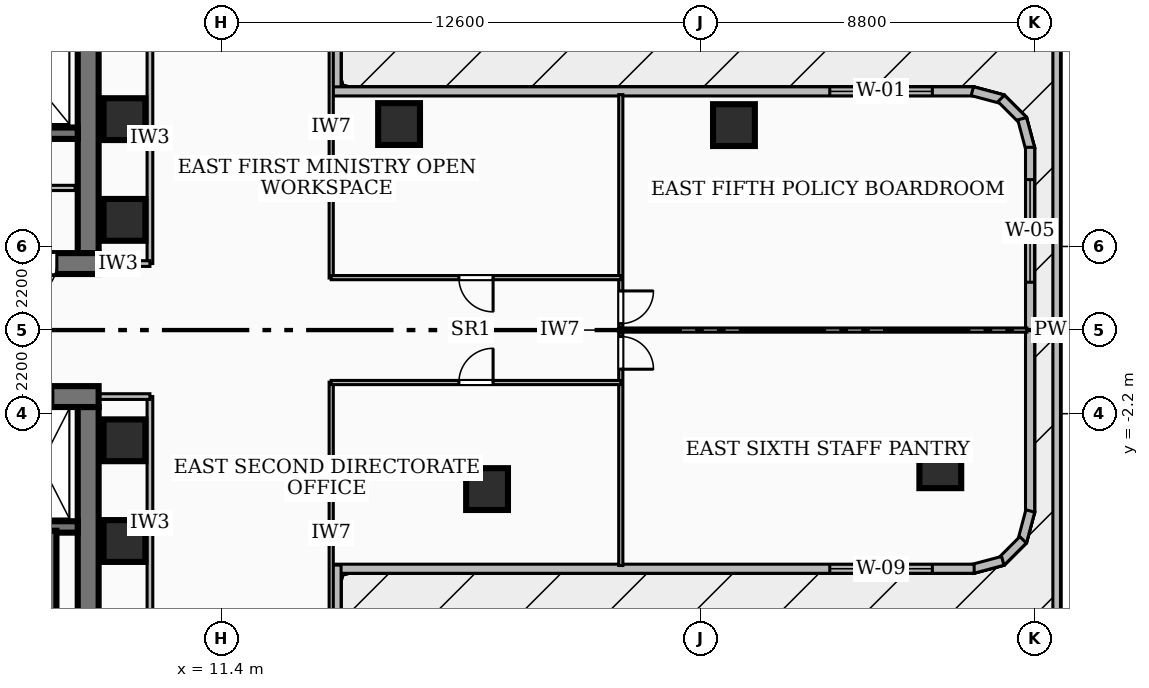
"""IFC4 building model, lengths in metres.
Left out: names, types, materials, properties, quantities, classifications, styles, units other than length and angle.
Written with IfcOpenShell. Run it as: python <this file> out.ifc"""

import sys

from ifc_helpers import new_model, si_unit, direction, frame, frame_2d, origin, origin_2d, place, context, subcontext, project, spatial, rectangle, extrude, element, fill, save


model = new_model("IFC4")
c1 = context("Model", 3, precision=1e-05, world=origin(), true_north=direction((0.0, 1.0)))
c2 = subcontext(c1, "Body", "Model", "MODEL_VIEW")
j1 = project(units=[si_unit("LENGTHUNIT", "METRE"), si_unit("PLANEANGLEUNIT", "RADIAN")], contexts=[c1])
p1 = place(None, origin())
s1 = spatial("IfcSite", under=j1, at=p1, CompositionType="ELEMENT")
p2 = place(p1, origin())
s2 = spatial("IfcBuilding", under=s1, at=p2, CompositionType="ELEMENT")
p3 = place(p2, frame((0.0, 0.0, 24.48)))
s3 = spatial("IfcBuildingStorey", under=s2, at=p3, CompositionType="ELEMENT", Elevation=24.48)
p4 = place(p3, frame((8.17, 1.75, 0.0), z_axis=(0.0, 0.0, 1.0), x_axis=(-1.0, 0.0, 0.0)))
e1 = element("IfcWall", 1, at=p4, inside=s3, PredefinedType="SHEAR", context=c2, shape_type="SweptSolid", body=[
    extrude(rectangle(XDim=16.34, YDim=0.55, at=frame_2d((8.17, 0.0))), origin(), (0.0, 0.0, 1.0), 3.34),
])
p5 = place(p4, frame((7.45, 0.0, 0.0)))
e2 = element("IfcOpeningElement", 2, at=p5, cuts=e1, PredefinedType="OPENING", context=c2, shape_type="SweptSolid", body=[
    extrude(rectangle(XDim=1.0, YDim=2.1, at=frame_2d((0.5, 1.05))), frame((0.0, 0.285, 0.0), z_axis=(0.0, -1.0, 0.0), x_axis=(1.0, 0.0, 0.0)), (0.0, 0.0, 1.0), 0.57),
])
p6 = place(p4, frame((3.4, 0.0, 0.0)))
e3 = element("IfcOpeningElement", 3, at=p6, cuts=e1, PredefinedType="OPENING", context=c2, shape_type="SweptSolid", body=[
    extrude(rectangle(XDim=0.9, YDim=2.06, at=frame_2d((0.45, 1.03))), frame((0.0, 0.285, 0.0), z_axis=(0.0, -1.0, 0.0), x_axis=(1.0, 0.0, 0.0)), (0.0, 0.0, 1.0), 0.57),
])
p7 = place(p4, frame((1.1, 0.0, 0.0)))
e4 = element("IfcOpeningElement", 4, at=p7, cuts=e1, PredefinedType="OPENING", context=c2, shape_type="SweptSolid", body=[
    extrude(rectangle(XDim=0.9, YDim=2.06, at=frame_2d((0.45, 1.03))), frame((0.0, 0.285, 0.0), z_axis=(0.0, -1.0, 0.0), x_axis=(1.0, 0.0, 0.0)), (0.0, 0.0, 1.0), 0.57),
])
p8 = place(p3, frame((7.895, 8.31, 0.0), z_axis=(0.0, 0.0, 1.0), x_axis=(0.0, -1.0, 0.0)))
e5 = element("IfcWall", 5, at=p8, inside=s3, PredefinedType="SHEAR", context=c2, shape_type="SweptSolid", body=[
    extrude(rectangle(XDim=6.285, YDim=0.55, at=frame_2d((3.143, 0.0))), origin(), (0.0, 0.0, 1.0), 3.34),
])
p9 = place(p3, frame((7.62, 5.18, 0.0), z_axis=(0.0, 0.0, 1.0), x_axis=(-1.0, 0.0, 0.0)))
e6 = element("IfcWall", 6, at=p9, inside=s3, PredefinedType="SOLIDWALL", context=c2, shape_type="SweptSolid", body=[
    extrude(rectangle(XDim=15.24, YDim=0.3, at=frame_2d((7.62, 0.0))), origin(), (0.0, 0.0, 1.0), 3.34),
])
p10 = place(p9, frame((5.77, 0.0, 0.0)))
e7 = element("IfcOpeningElement", 7, at=p10, cuts=e6, PredefinedType="OPENING", context=c2, shape_type="SweptSolid", body=[
    extrude(rectangle(XDim=1.1, YDim=2.15, at=frame_2d((0.55, 1.075))), frame((0.0, 0.16, 0.0), z_axis=(0.0, -1.0, 0.0), x_axis=(1.0, 0.0, 0.0)), (0.0, 0.0, 1.0), 0.32),
])
p11 = place(p9, frame((2.97, 0.0, 0.0)))
e8 = element("IfcOpeningElement", 8, at=p11, cuts=e6, PredefinedType="OPENING", context=c2, shape_type="SweptSolid", body=[
    extrude(rectangle(XDim=1.1, YDim=2.15, at=frame_2d((0.55, 1.075))), frame((0.0, 0.16, 0.0), z_axis=(0.0, -1.0, 0.0), x_axis=(1.0, 0.0, 0.0)), (0.0, 0.0, 1.0), 0.32),
])
p12 = place(p9, frame((7.97, 0.0, 0.0)))
e9 = element("IfcOpeningElement", 9, at=p12, cuts=e6, PredefinedType="OPENING", context=c2, shape_type="SweptSolid", body=[
    extrude(rectangle(XDim=1.0, YDim=2.1, at=frame_2d((0.5, 1.05))), frame((0.0, 0.16, 0.0), z_axis=(0.0, -1.0, 0.0), x_axis=(1.0, 0.0, 0.0)), (0.0, 0.0, 1.0), 0.32),
])
p13 = place(p3, frame((-8.17, -1.75, 0.0), z_axis=(0.0, 0.0, 1.0), x_axis=(1.0, 0.0, 0.0)))
e10 = element("IfcWall", 10, at=p13, inside=s3, PredefinedType="SHEAR", context=c2, shape_type="SweptSolid", body=[
    extrude(rectangle(XDim=16.34, YDim=0.55, at=frame_2d((8.17, 0.0))), origin(), (0.0, 0.0, 1.0), 3.34),
])
p14 = place(p13, frame((7.45, 0.0, 0.0)))
e11 = element("IfcOpeningElement", 11, at=p14, cuts=e10, PredefinedType="OPENING", context=c2, shape_type="SweptSolid", body=[
    extrude(rectangle(XDim=1.0, YDim=2.1, at=frame_2d((0.5, 1.05))), frame((0.0, 0.285, 0.0), z_axis=(0.0, -1.0, 0.0), x_axis=(1.0, 0.0, 0.0)), (0.0, 0.0, 1.0), 0.57),
])
p15 = place(p13, frame((10.965, 0.0, 0.0)))
e12 = element("IfcOpeningElement", 12, at=p15, cuts=e10, PredefinedType="OPENING", context=c2, shape_type="SweptSolid", body=[
    extrude(rectangle(XDim=1.05, YDim=2.15, at=frame_2d((0.525, 1.075))), frame((0.0, 0.285, 0.0), z_axis=(0.0, -1.0, 0.0), x_axis=(1.0, 0.0, 0.0)), (0.0, 0.0, 1.0), 0.57),
])
p16 = place(p13, frame((12.525, 0.0, 0.0)))
e13 = element("IfcOpeningElement", 13, at=p16, cuts=e10, PredefinedType="OPENING", context=c2, shape_type="SweptSolid", body=[
    extrude(rectangle(XDim=1.05, YDim=2.15, at=frame_2d((0.525, 1.075))), frame((0.0, 0.285, 0.0), z_axis=(0.0, -1.0, 0.0), x_axis=(1.0, 0.0, 0.0)), (0.0, 0.0, 1.0), 0.57),
])
p17 = place(p13, frame((14.085, 0.0, 0.0)))
e14 = element("IfcOpeningElement", 14, at=p17, cuts=e10, PredefinedType="OPENING", context=c2, shape_type="SweptSolid", body=[
    extrude(rectangle(XDim=1.05, YDim=2.15, at=frame_2d((0.525, 1.075))), frame((0.0, 0.285, 0.0), z_axis=(0.0, -1.0, 0.0), x_axis=(1.0, 0.0, 0.0)), (0.0, 0.0, 1.0), 0.57),
])
p18 = place(p3, frame((7.895, -2.025, 0.0), z_axis=(0.0, 0.0, 1.0), x_axis=(0.0, -1.0, 0.0)))
e15 = element("IfcWall", 15, at=p18, inside=s3, PredefinedType="SHEAR", context=c2, shape_type="SweptSolid", body=[
    extrude(rectangle(XDim=6.285, YDim=0.55, at=frame_2d((3.143, 0.0))), origin(), (0.0, 0.0, 1.0), 3.34),
])
p19 = place(p3, frame((-7.62, -5.18, 0.0), z_axis=(0.0, 0.0, 1.0), x_axis=(1.0, 0.0, 0.0)))
e16 = element("IfcWall", 16, at=p19, inside=s3, PredefinedType="SOLIDWALL", context=c2, shape_type="SweptSolid", body=[
    extrude(rectangle(XDim=15.24, YDim=0.3, at=frame_2d((7.62, 0.0))), origin(), (0.0, 0.0, 1.0), 3.34),
])
p20 = place(p19, frame((5.77, 0.0, 0.0)))
e17 = element("IfcOpeningElement", 17, at=p20, cuts=e16, PredefinedType="OPENING", context=c2, shape_type="SweptSolid", body=[
    extrude(rectangle(XDim=1.1, YDim=2.15, at=frame_2d((0.55, 1.075))), frame((0.0, 0.16, 0.0), z_axis=(0.0, -1.0, 0.0), x_axis=(1.0, 0.0, 0.0)), (0.0, 0.0, 1.0), 0.32),
])
p21 = place(p19, frame((7.97, 0.0, 0.0)))
e18 = element("IfcOpeningElement", 18, at=p21, cuts=e16, PredefinedType="OPENING", context=c2, shape_type="SweptSolid", body=[
    extrude(rectangle(XDim=1.0, YDim=2.1, at=frame_2d((0.5, 1.05))), frame((0.0, 0.16, 0.0), z_axis=(0.0, -1.0, 0.0), x_axis=(1.0, 0.0, 0.0)), (0.0, 0.0, 1.0), 0.32),
])
p22 = place(p3, frame((6.95, -8.34, 0.0), z_axis=(0.0, 0.0, 1.0), x_axis=(0.0, 1.0, 0.0)))
e19 = element("IfcWall", 19, at=p22, inside=s3, PredefinedType="SOLIDWALL", context=c2, shape_type="SweptSolid", body=[
    extrude(rectangle(XDim=3.06, YDim=0.22, at=frame_2d((1.53, 0.0))), origin(), (0.0, 0.0, 1.0), 3.34),
])
for number, where, z_axis, x_axis in (
    (20, (8.85, -5.55, 0.0), (0.0, 0.0, 1.0), (1.0, 0.0, 0.0)),
    (21, (8.85, -2.9, 0.0), (0.0, 0.0, 1.0), (1.0, 0.0, 0.0)),
    (22, (8.85, 2.9, 0.0), (0.0, 0.0, 1.0), (1.0, 0.0, 0.0)),
    (23, (8.85, 5.55, 0.0), (0.0, 0.0, 1.0), (1.0, 0.0, 0.0)),
    (24, (18.391, -4.184, 0.0), (0.0, 0.0, 1.0), (1.0, 0.0, 0.0)),
    (25, (16.076, 5.421, 0.0), (0.0, 0.0, 1.0), (1.0, 0.0, 0.0)),
    (26, (30.318, -3.609, 0.0), (0.0, 0.0, 1.0), (1.0, 0.0, 0.0)),
    (27, (24.888, 5.393, 0.0), (0.0, 0.0, 1.0), (1.0, 0.0, 0.0)),
):
    element("IfcColumn", number, at=place(p3, frame(where, z_axis=z_axis, x_axis=x_axis)), inside=s3, PredefinedType="COLUMN", context=c2, shape_type="SweptSolid", body=[
        extrude(rectangle(XDim=1.1, YDim=1.1, at=origin_2d()), origin(), (0.0, 0.0, 1.0), 3.6),
    ])
p23 = place(p3, frame((14.43, 12.959, 0.0), z_axis=(0.0, 0.0, 1.0), x_axis=(0.0, -1.0, 0.0)))
e28 = element("IfcWall", 28, at=p23, inside=s3, PredefinedType="SOLIDWALL", context=c2, shape_type="SweptSolid", body=[
    extrude(rectangle(XDim=6.775, YDim=0.24, at=frame_2d((3.387, 0.0))), origin(), (0.0, 0.0, 1.0), 3.34),
])
p24 = place(p3, frame((14.334, 6.28, 0.0), z_axis=(0.0, 0.0, 1.0), x_axis=(1.0, 0.0, 0.0)))
e29 = element("IfcWall", 29, at=p24, inside=s3, PredefinedType="SOLIDWALL", context=c2, shape_type="SweptSolid", body=[
    extrude(rectangle(XDim=16.875, YDim=0.24, at=frame_2d((8.438, 0.0))), origin(), (0.0, 0.0, 1.0), 3.34),
])
p25 = place(p24, frame((13.075, 0.0, 0.85)))
e30 = element("IfcOpeningElement", 30, at=p25, cuts=e29, PredefinedType="OPENING", context=c2, shape_type="SweptSolid", body=[
    extrude(rectangle(XDim=2.7, YDim=2.1, at=frame_2d((1.35, 1.05))), frame((0.0, 0.13, 0.0), z_axis=(0.0, -1.0, 0.0), x_axis=(1.0, 0.0, 0.0)), (0.0, 0.0, 1.0), 0.26),
])
p26 = place(p3, frame((31.16, 6.286, 0.0), z_axis=(0.0, 0.0, 1.0), x_axis=(0.966234939601, -0.25766265056, 0.0)))
e31 = element("IfcWall", 31, at=p26, inside=s3, PredefinedType="SOLIDWALL", context=c2, shape_type="SweptSolid", body=[
    extrude(rectangle(XDim=0.83, YDim=0.24, at=frame_2d((0.415, 0.0))), origin(), (0.0, 0.0, 1.0), 3.34),
])
p27 = place(p3, frame((31.92, 6.096, 0.0), z_axis=(0.0, 0.0, 1.0), x_axis=(0.707256607812, -0.706956922808, 0.0)))
e32 = element("IfcWall", 32, at=p27, inside=s3, PredefinedType="SOLIDWALL", context=c2, shape_type="SweptSolid", body=[
    extrude(rectangle(XDim=0.815, YDim=0.24, at=frame_2d((0.407, 0.0))), origin(), (0.0, 0.0, 1.0), 3.34),
])
p28 = place(p3, frame((32.472, 5.562, 0.0), z_axis=(0.0, 0.0, 1.0), x_axis=(0.257937227116, -0.966161677396, 0.0)))
e33 = element("IfcWall", 33, at=p28, inside=s3, PredefinedType="SOLIDWALL", context=c2, shape_type="SweptSolid", body=[
    extrude(rectangle(XDim=0.83, YDim=0.24, at=frame_2d((0.415, 0.0))), origin(), (0.0, 0.0, 1.0), 3.34),
])
p29 = place(p3, frame((32.68, 4.809, 0.0), z_axis=(0.0, 0.0, 1.0), x_axis=(0.0, -1.0, 0.0)))
e34 = element("IfcWall", 34, at=p29, inside=s3, PredefinedType="SOLIDWALL", context=c2, shape_type="SweptSolid", body=[
    extrude(rectangle(XDim=9.618, YDim=0.24, at=frame_2d((4.809, 0.0))), origin(), (0.0, 0.0, 1.0), 3.34),
])
p30 = place(p29, frame((0.85, 0.0, 0.85)))
e35 = element("IfcOpeningElement", 35, at=p30, cuts=e34, PredefinedType="OPENING", context=c2, shape_type="SweptSolid", body=[
    extrude(rectangle(XDim=2.7, YDim=1.85, at=frame_2d((1.35, 0.925))), frame((0.0, 0.13, 0.0), z_axis=(0.0, -1.0, 0.0), x_axis=(1.0, 0.0, 0.0)), (0.0, 0.0, 1.0), 0.26),
])
p31 = place(p3, frame((32.686, -4.76, 0.0), z_axis=(0.0, 0.0, 1.0), x_axis=(-0.257937227116, -0.966161677396, 0.0)))
e36 = element("IfcWall", 36, at=p31, inside=s3, PredefinedType="SOLIDWALL", context=c2, shape_type="SweptSolid", body=[
    extrude(rectangle(XDim=0.83, YDim=0.24, at=frame_2d((0.415, 0.0))), origin(), (0.0, 0.0, 1.0), 3.34),
])
p32 = place(p3, frame((32.496, -5.52, 0.0), z_axis=(0.0, 0.0, 1.0), x_axis=(-0.707256607812, -0.706956922808, 0.0)))
e37 = element("IfcWall", 37, at=p32, inside=s3, PredefinedType="SOLIDWALL", context=c2, shape_type="SweptSolid", body=[
    extrude(rectangle(XDim=0.815, YDim=0.24, at=frame_2d((0.407, 0.0))), origin(), (0.0, 0.0, 1.0), 3.34),
])
p33 = place(p3, frame((31.962, -6.072, 0.0), z_axis=(0.0, 0.0, 1.0), x_axis=(-0.966234939601, -0.25766265056, 0.0)))
e38 = element("IfcWall", 38, at=p33, inside=s3, PredefinedType="SOLIDWALL", context=c2, shape_type="SweptSolid", body=[
    extrude(rectangle(XDim=0.83, YDim=0.24, at=frame_2d((0.415, 0.0))), origin(), (0.0, 0.0, 1.0), 3.34),
])
p34 = place(p3, frame((31.209, -6.28, 0.0), z_axis=(0.0, 0.0, 1.0), x_axis=(-1.0, 0.0, 0.0)))
e39 = element("IfcWall", 39, at=p34, inside=s3, PredefinedType="SOLIDWALL", context=c2, shape_type="SweptSolid", body=[
    extrude(rectangle(XDim=16.875, YDim=0.24, at=frame_2d((8.438, 0.0))), origin(), (0.0, 0.0, 1.0), 3.34),
])
p35 = place(p34, frame((1.1, 0.0, 0.85)))
e40 = element("IfcOpeningElement", 40, at=p35, cuts=e39, PredefinedType="OPENING", context=c2, shape_type="SweptSolid", body=[
    extrude(rectangle(XDim=2.7, YDim=1.65, at=frame_2d((1.35, 0.825))), frame((0.0, 0.13, 0.0), z_axis=(0.0, -1.0, 0.0), x_axis=(1.0, 0.0, 0.0)), (0.0, 0.0, 1.0), 0.26),
])
p36 = place(p3, frame((14.43, -6.184, 0.0), z_axis=(0.0, 0.0, 1.0), x_axis=(0.0, -1.0, 0.0)))
e41 = element("IfcWall", 41, at=p36, inside=s3, PredefinedType="SOLIDWALL", context=c2, shape_type="SweptSolid", body=[
    extrude(rectangle(XDim=6.775, YDim=0.24, at=frame_2d((3.387, 0.0))), origin(), (0.0, 0.0, 1.0), 3.34),
])
p37 = place(p3, frame((33.38, -27.32, 0.0), z_axis=(0.0, 0.0, 1.0), x_axis=(0.0, 1.0, 0.0)))
e42 = element("IfcWall", 42, at=p37, inside=s3, PredefinedType="PARAPET", context=c2, shape_type="SweptSolid", body=[
    extrude(rectangle(XDim=54.64, YDim=0.2, at=frame_2d((27.32, 0.0))), origin(), (0.0, 0.0, 1.0), 0.88),
])
p38 = place(p3, frame((2.9, 3.74, 0.0), z_axis=(0.0, 0.0, 1.0), x_axis=(1.0, 0.0, 0.0)))
e43 = element("IfcWall", 43, at=p38, inside=s3, PredefinedType="PARTITIONING", context=c2, shape_type="SweptSolid", body=[
    extrude(rectangle(XDim=4.65, YDim=0.138, at=frame_2d((2.325, 0.0))), origin(), (0.0, 0.0, 1.0), 3.34),
])
p39 = place(p3, frame((9.52, 1.75, 0.0), z_axis=(0.0, 0.0, 1.0), x_axis=(0.0, 1.0, 0.0)))
e44 = element("IfcWall", 44, at=p39, inside=s3, PredefinedType="PARTITIONING", context=c2, shape_type="SweptSolid", body=[
    extrude(rectangle(XDim=6.63, YDim=0.15, at=frame_2d((3.315, 0.0))), origin(), (0.0, 0.0, 1.0), 2.421),
])
p40 = place(p3, frame((7.85, 1.75, 0.0), z_axis=(0.0, 0.0, 1.0), x_axis=(1.0, 0.0, 0.0)))
e45 = element("IfcWall", 45, at=p40, inside=s3, PredefinedType="PARTITIONING", context=c2, shape_type="SweptSolid", body=[
    extrude(rectangle(XDim=1.67, YDim=0.15, at=frame_2d((0.835, 0.0))), origin(), (0.0, 0.0, 1.0), 2.405),
])
p41 = place(p3, frame((9.52, -8.38, 0.0), z_axis=(0.0, 0.0, 1.0), x_axis=(0.0, 1.0, 0.0)))
e46 = element("IfcWall", 46, at=p41, inside=s3, PredefinedType="PARTITIONING", context=c2, shape_type="SweptSolid", body=[
    extrude(rectangle(XDim=6.63, YDim=0.15, at=frame_2d((3.315, 0.0))), origin(), (0.0, 0.0, 1.0), 2.421),
])
p42 = place(p3, frame((7.85, -1.75, 0.0), z_axis=(0.0, 0.0, 1.0), x_axis=(1.0, 0.0, 0.0)))
e47 = element("IfcWall", 47, at=p42, inside=s3, PredefinedType="PARTITIONING", context=c2, shape_type="SweptSolid", body=[
    extrude(rectangle(XDim=1.67, YDim=0.15, at=frame_2d((0.835, 0.0))), origin(), (0.0, 0.0, 1.0), 2.405),
])
for number, where, z_axis, x_axis in (
    (48, (14.29, 1.37, 0.0), (0.0, 0.0, 1.0), (0.0, 1.0, 0.0)),
    (49, (14.29, -9.32, 0.0), (0.0, 0.0, 1.0), (0.0, 1.0, 0.0)),
):
    element("IfcWall", number, at=place(p3, frame(where, z_axis=z_axis, x_axis=x_axis)), inside=s3, PredefinedType="PARTITIONING", context=c2, shape_type="SweptSolid", body=[
        extrude(rectangle(XDim=7.95, YDim=0.11, at=frame_2d((3.975, 0.0))), origin(), (0.0, 0.0, 1.0), 2.421),
    ])
p43 = place(p3, frame((21.91, 1.38, 0.0), z_axis=(0.0, 0.0, 1.0), x_axis=(-1.0, 0.0, 0.0)))
e50 = element("IfcWall", 50, at=p43, inside=s3, PredefinedType="PARTITIONING", context=c2, shape_type="SweptSolid", body=[
    extrude(rectangle(XDim=7.62, YDim=0.11, at=frame_2d((3.81, 0.0))), origin(), (0.0, 0.0, 1.0), 2.869),
])
p44 = place(p43, frame((3.36, 0.0, 0.0)))
e51 = element("IfcOpeningElement", 51, at=p44, cuts=e50, PredefinedType="OPENING", context=c2, shape_type="SweptSolid", body=[
    extrude(rectangle(XDim=0.9, YDim=2.06, at=frame_2d((0.45, 1.03))), frame((0.0, 0.065, 0.0), z_axis=(0.0, -1.0, 0.0), x_axis=(1.0, 0.0, 0.0)), (0.0, 0.0, 1.0), 0.13),
])
p45 = place(p3, frame((14.29, -1.38, 0.0), z_axis=(0.0, 0.0, 1.0), x_axis=(1.0, 0.0, 0.0)))
e52 = element("IfcWall", 52, at=p45, inside=s3, PredefinedType="PARTITIONING", context=c2, shape_type="SweptSolid", body=[
    extrude(rectangle(XDim=7.62, YDim=0.11, at=frame_2d((3.81, 0.0))), origin(), (0.0, 0.0, 1.0), 2.869),
])
p46 = place(p45, frame((3.36, 0.0, 0.0)))
e53 = element("IfcOpeningElement", 53, at=p46, cuts=e52, PredefinedType="OPENING", context=c2, shape_type="SweptSolid", body=[
    extrude(rectangle(XDim=0.9, YDim=2.06, at=frame_2d((0.45, 1.03))), frame((0.0, 0.065, 0.0), z_axis=(0.0, -1.0, 0.0), x_axis=(1.0, 0.0, 0.0)), (0.0, 0.0, 1.0), 0.13),
])
p47 = place(p3, frame((21.97, 0.0, 0.0), z_axis=(0.0, 0.0, 1.0), x_axis=(1.0, 0.0, 0.0)))
e54 = element("IfcWall", 54, at=p47, inside=s3, PredefinedType="PARTITIONING", context=c2, shape_type="SweptSolid", body=[
    extrude(rectangle(XDim=10.625, YDim=0.11, at=frame_2d((5.312, 0.0))), origin(), (0.0, 0.0, 1.0), 2.72),
])
p48 = place(p3, frame((21.91, 6.195, 0.0), z_axis=(0.0, 0.0, 1.0), x_axis=(0.0, -1.0, 0.0)))
e55 = element("IfcWall", 55, at=p48, inside=s3, PredefinedType="PARTITIONING", context=c2, shape_type="SweptSolid", body=[
    extrude(rectangle(XDim=12.39, YDim=0.11, at=frame_2d((6.195, 0.0))), origin(), (0.0, 0.0, 1.0), 2.421),
])
p49 = place(p48, frame((6.365, 0.0, 0.0)))
e56 = element("IfcOpeningElement", 56, at=p49, cuts=e55, PredefinedType="OPENING", context=c2, shape_type="SweptSolid", body=[
    extrude(rectangle(XDim=0.86, YDim=2.04, at=frame_2d((0.43, 1.02))), frame((0.0, 0.065, 0.0), z_axis=(0.0, -1.0, 0.0), x_axis=(1.0, 0.0, 0.0)), (0.0, 0.0, 1.0), 0.13),
])
p50 = place(p48, frame((5.165, 0.0, 0.0)))
e57 = element("IfcOpeningElement", 57, at=p50, cuts=e55, PredefinedType="OPENING", context=c2, shape_type="SweptSolid", body=[
    extrude(rectangle(XDim=0.86, YDim=2.04, at=frame_2d((0.43, 1.02))), frame((0.0, 0.065, 0.0), z_axis=(0.0, -1.0, 0.0), x_axis=(1.0, 0.0, 0.0)), (0.0, 0.0, 1.0), 0.13),
])
p51 = place(p25, origin())
e58 = element("IfcWindow", 58, at=p51, inside=s3, PartitioningType="SINGLE_PANEL", PredefinedType="WINDOW", context=c2, shape_type="SweptSolid", body=[
    extrude(rectangle(XDim=2.7, YDim=2.1, at=frame_2d((1.35, 1.05))), frame((0.0, 0.03, 0.0), z_axis=(0.0, -1.0, 0.0), x_axis=(1.0, 0.0, 0.0)), (0.0, 0.0, 1.0), 0.06),
])
fill(e30, e58)
p52 = place(p30, origin())
e59 = element("IfcWindow", 59, at=p52, inside=s3, PartitioningType="SINGLE_PANEL", PredefinedType="WINDOW", context=c2, shape_type="SweptSolid", body=[
    extrude(rectangle(XDim=2.7, YDim=1.85, at=frame_2d((1.35, 0.925))), frame((0.0, 0.03, 0.0), z_axis=(0.0, -1.0, 0.0), x_axis=(1.0, 0.0, 0.0)), (0.0, 0.0, 1.0), 0.06),
])
fill(e35, e59)
p53 = place(p35, origin())
e60 = element("IfcWindow", 60, at=p53, inside=s3, PartitioningType="SINGLE_PANEL", PredefinedType="WINDOW", context=c2, shape_type="SweptSolid", body=[
    extrude(rectangle(XDim=2.7, YDim=1.65, at=frame_2d((1.35, 0.825))), frame((0.0, 0.03, 0.0), z_axis=(0.0, -1.0, 0.0), x_axis=(1.0, 0.0, 0.0)), (0.0, 0.0, 1.0), 0.06),
])
fill(e40, e60)
p54 = place(p17, origin())
e61 = element("IfcDoor", 61, at=p54, inside=s3, OperationType="DOUBLE_DOOR_SLIDING", PredefinedType="DOOR", context=c2, shape_type="SweptSolid", body=[
    extrude(rectangle(XDim=1.05, YDim=2.15, at=frame_2d((0.525, 1.075))), frame((0.0, 0.025, 0.0), z_axis=(0.0, -1.0, 0.0), x_axis=(1.0, 0.0, 0.0)), (0.0, 0.0, 1.0), 0.05),
])
fill(e14, e61)
p55 = place(p7, origin())
e62 = element("IfcDoor", 62, at=p55, inside=s3, OperationType="SINGLE_SWING_RIGHT", PredefinedType="DOOR", context=c2, shape_type="SweptSolid", body=[
    extrude(rectangle(XDim=0.9, YDim=2.06, at=frame_2d((0.45, 1.03))), frame((0.0, 0.025, 0.0), z_axis=(0.0, -1.0, 0.0), x_axis=(1.0, 0.0, 0.0)), (0.0, 0.0, 1.0), 0.05),
])
fill(e4, e62)
p56 = place(p44, origin())
e63 = element("IfcDoor", 63, at=p56, inside=s3, OperationType="SINGLE_SWING_LEFT", PredefinedType="DOOR", context=c2, shape_type="SweptSolid", body=[
    extrude(rectangle(XDim=0.9, YDim=2.06, at=frame_2d((0.45, 1.03))), frame((0.0, 0.025, 0.0), z_axis=(0.0, -1.0, 0.0), x_axis=(1.0, 0.0, 0.0)), (0.0, 0.0, 1.0), 0.05),
])
fill(e51, e63)
p57 = place(p46, origin())
e64 = element("IfcDoor", 64, at=p57, inside=s3, OperationType="SINGLE_SWING_RIGHT", PredefinedType="DOOR", context=c2, shape_type="SweptSolid", body=[
    extrude(rectangle(XDim=0.9, YDim=2.06, at=frame_2d((0.45, 1.03))), frame((0.0, 0.025, 0.0), z_axis=(0.0, -1.0, 0.0), x_axis=(1.0, 0.0, 0.0)), (0.0, 0.0, 1.0), 0.05),
])
fill(e53, e64)
p58 = place(p49, origin())
e65 = element("IfcDoor", 65, at=p58, inside=s3, OperationType="SINGLE_SWING_RIGHT", PredefinedType="DOOR", context=c2, shape_type="SweptSolid", body=[
    extrude(rectangle(XDim=0.86, YDim=2.04, at=frame_2d((0.43, 1.02))), frame((0.0, 0.025, 0.0), z_axis=(0.0, -1.0, 0.0), x_axis=(1.0, 0.0, 0.0)), (0.0, 0.0, 1.0), 0.05),
])
fill(e56, e65)
p59 = place(p50, origin())
e66 = element("IfcDoor", 66, at=p59, inside=s3, OperationType="SINGLE_SWING_LEFT", PredefinedType="DOOR", context=c2, shape_type="SweptSolid", body=[
    extrude(rectangle(XDim=0.86, YDim=2.04, at=frame_2d((0.43, 1.02))), frame((0.0, 0.025, 0.0), z_axis=(0.0, -1.0, 0.0), x_axis=(1.0, 0.0, 0.0)), (0.0, 0.0, 1.0), 0.05),
])
fill(e57, e66)
save(model, sys.argv[1])
